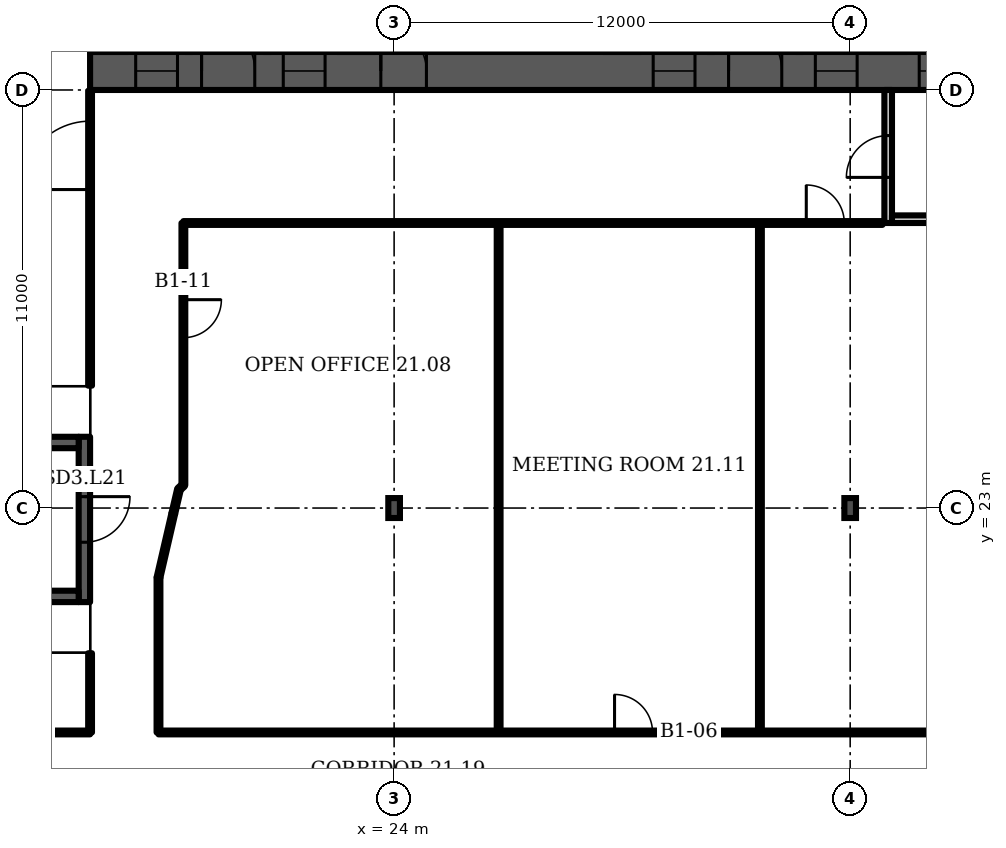
"""IFC4 building model, lengths in metres.
Left out: names, types, materials, properties, quantities, classifications, styles, units other than length and angle.
Written with IfcOpenShell. Run it as: python <this file> out.ifc"""

import sys

from ifc_helpers import new_model, si_unit, direction, frame, frame_2d, origin, origin_2d, place, context, subcontext, project, spatial, rectangle, i_section, extrude, element, fill, save


model = new_model("IFC4")
c1 = context("Model", 3, precision=1e-05, world=origin(), true_north=direction((0.0, 1.0)))
c2 = subcontext(c1, "Body", "Model", "MODEL_VIEW")
j1 = project(units=[si_unit("LENGTHUNIT", "METRE"), si_unit("PLANEANGLEUNIT", "RADIAN")], contexts=[c1])
p1 = place(None, origin())
s1 = spatial("IfcSite", under=j1, at=p1, CompositionType="ELEMENT")
p2 = place(p1, origin())
s2 = spatial("IfcBuilding", under=s1, at=p2, CompositionType="ELEMENT")
p3 = place(p2, frame((0.0, 0.0, 96.7)))
s3 = spatial("IfcBuildingStorey", under=s2, at=p3, CompositionType="ELEMENT", Elevation=96.7)
p4 = place(p3, frame((16.0, 34.5, 0.0), z_axis=(0.0, 0.0, 1.0), x_axis=(1.0, 0.0, 0.0)))
e1 = element("IfcWall", 1, at=p4, inside=s3, PredefinedType="SHEAR", context=c2, shape_type="SweptSolid", body=[
    extrude(rectangle(XDim=49.0, YDim=1.0, at=frame_2d((24.5, 0.0))), origin(), (0.0, 0.0, 1.0), 3.6),
])
p5 = place(p4, frame((1.2, 0.0, 0.0)))
e2 = element("IfcOpeningElement", 2, at=p5, cuts=e1, PredefinedType="OPENING", context=c2, shape_type="SweptSolid", body=[
    extrude(rectangle(XDim=1.1, YDim=2.1, at=frame_2d((0.55, 1.05))), frame((0.0, 0.51, 0.0), z_axis=(0.0, -1.0, 0.0), x_axis=(1.0, 0.0, 0.0)), (0.0, 0.0, 1.0), 1.02),
])
p6 = place(p4, frame((5.083, 0.0, 0.0)))
e3 = element("IfcOpeningElement", 3, at=p6, cuts=e1, PredefinedType="OPENING", context=c2, shape_type="SweptSolid", body=[
    extrude(rectangle(XDim=1.1, YDim=2.1, at=frame_2d((0.55, 1.05))), frame((0.0, 0.51, 0.0), z_axis=(0.0, -1.0, 0.0), x_axis=(1.0, 0.0, 0.0)), (0.0, 0.0, 1.0), 1.02),
])
p7 = place(p4, frame((2.933, 0.0, 0.0)))
e4 = element("IfcOpeningElement", 4, at=p7, cuts=e1, PredefinedType="OPENING", context=c2, shape_type="SweptSolid", body=[
    extrude(rectangle(XDim=1.4, YDim=2.1, at=frame_2d((0.7, 1.05))), frame((0.0, 0.51, 0.0), z_axis=(0.0, -1.0, 0.0), x_axis=(1.0, 0.0, 0.0)), (0.0, 0.0, 1.0), 1.02),
])
p8 = place(p4, frame((7.65, 0.0, 0.0)))
e5 = element("IfcOpeningElement", 5, at=p8, cuts=e1, PredefinedType="OPENING", context=c2, shape_type="SweptSolid", body=[
    extrude(rectangle(XDim=1.2, YDim=2.1, at=frame_2d((0.6, 1.05))), frame((0.0, 0.51, 0.0), z_axis=(0.0, -1.0, 0.0), x_axis=(1.0, 0.0, 0.0)), (0.0, 0.0, 1.0), 1.02),
])
p9 = place(p4, frame((14.817, 0.0, 0.0)))
e6 = element("IfcOpeningElement", 6, at=p9, cuts=e1, PredefinedType="OPENING", context=c2, shape_type="SweptSolid", body=[
    extrude(rectangle(XDim=1.1, YDim=2.1, at=frame_2d((0.55, 1.05))), frame((0.0, 0.51, 0.0), z_axis=(0.0, -1.0, 0.0), x_axis=(1.0, 0.0, 0.0)), (0.0, 0.0, 1.0), 1.02),
])
p10 = place(p4, frame((19.083, 0.0, 0.0)))
e7 = element("IfcOpeningElement", 7, at=p10, cuts=e1, PredefinedType="OPENING", context=c2, shape_type="SweptSolid", body=[
    extrude(rectangle(XDim=1.1, YDim=2.1, at=frame_2d((0.55, 1.05))), frame((0.0, 0.51, 0.0), z_axis=(0.0, -1.0, 0.0), x_axis=(1.0, 0.0, 0.0)), (0.0, 0.0, 1.0), 1.02),
])
p11 = place(p4, frame((16.8, 0.0, 0.0)))
e8 = element("IfcOpeningElement", 8, at=p11, cuts=e1, PredefinedType="OPENING", context=c2, shape_type="SweptSolid", body=[
    extrude(rectangle(XDim=1.4, YDim=2.1, at=frame_2d((0.7, 1.05))), frame((0.0, 0.51, 0.0), z_axis=(0.0, -1.0, 0.0), x_axis=(1.0, 0.0, 0.0)), (0.0, 0.0, 1.0), 1.02),
])
p12 = place(p4, frame((21.817, 0.0, 0.0)))
e9 = element("IfcOpeningElement", 9, at=p12, cuts=e1, PredefinedType="OPENING", context=c2, shape_type="SweptSolid", body=[
    extrude(rectangle(XDim=1.1, YDim=2.1, at=frame_2d((0.55, 1.05))), frame((0.0, 0.51, 0.0), z_axis=(0.0, -1.0, 0.0), x_axis=(1.0, 0.0, 0.0)), (0.0, 0.0, 1.0), 1.02),
])
p13 = place(p4, frame((26.083, 0.0, 0.0)))
e10 = element("IfcOpeningElement", 10, at=p13, cuts=e1, PredefinedType="OPENING", context=c2, shape_type="SweptSolid", body=[
    extrude(rectangle(XDim=1.1, YDim=2.1, at=frame_2d((0.55, 1.05))), frame((0.0, 0.51, 0.0), z_axis=(0.0, -1.0, 0.0), x_axis=(1.0, 0.0, 0.0)), (0.0, 0.0, 1.0), 1.02),
])
p14 = place(p4, frame((33.15, 0.0, 0.0)))
e11 = element("IfcOpeningElement", 11, at=p14, cuts=e1, PredefinedType="OPENING", context=c2, shape_type="SweptSolid", body=[
    extrude(rectangle(XDim=1.2, YDim=2.1, at=frame_2d((0.6, 1.05))), frame((0.0, 0.51, 0.0), z_axis=(0.0, -1.0, 0.0), x_axis=(1.0, 0.0, 0.0)), (0.0, 0.0, 1.0), 1.02),
])
p15 = place(p4, frame((37.8, 0.0, 0.0)))
e12 = element("IfcOpeningElement", 12, at=p15, cuts=e1, PredefinedType="OPENING", context=c2, shape_type="SweptSolid", body=[
    extrude(rectangle(XDim=1.4, YDim=2.1, at=frame_2d((0.7, 1.05))), frame((0.0, 0.51, 0.0), z_axis=(0.0, -1.0, 0.0), x_axis=(1.0, 0.0, 0.0)), (0.0, 0.0, 1.0), 1.02),
])
p16 = place(p4, frame((42.817, 0.0, 0.0)))
e13 = element("IfcOpeningElement", 13, at=p16, cuts=e1, PredefinedType="OPENING", context=c2, shape_type="SweptSolid", body=[
    extrude(rectangle(XDim=1.1, YDim=2.1, at=frame_2d((0.55, 1.05))), frame((0.0, 0.51, 0.0), z_axis=(0.0, -1.0, 0.0), x_axis=(1.0, 0.0, 0.0)), (0.0, 0.0, 1.0), 1.02),
])
p17 = place(p4, frame((46.7, 0.0, 0.0)))
e14 = element("IfcOpeningElement", 14, at=p17, cuts=e1, PredefinedType="OPENING", context=c2, shape_type="SweptSolid", body=[
    extrude(rectangle(XDim=1.1, YDim=2.1, at=frame_2d((0.55, 1.05))), frame((0.0, 0.51, 0.0), z_axis=(0.0, -1.0, 0.0), x_axis=(1.0, 0.0, 0.0)), (0.0, 0.0, 1.0), 1.02),
])
p18 = place(p4, frame((44.667, 0.0, 0.0)))
e15 = element("IfcOpeningElement", 15, at=p18, cuts=e1, PredefinedType="OPENING", context=c2, shape_type="SweptSolid", body=[
    extrude(rectangle(XDim=1.4, YDim=2.1, at=frame_2d((0.7, 1.05))), frame((0.0, 0.51, 0.0), z_axis=(0.0, -1.0, 0.0), x_axis=(1.0, 0.0, 0.0)), (0.0, 0.0, 1.0), 1.02),
])
for number, where, z_axis, x_axis in (
    (16, (24.0, 23.0, 0.0), (0.0, 0.0, 1.0), (1.0, 0.0, 0.0)),
    (17, (36.0, 23.0, 0.0), (0.0, 0.0, 1.0), (1.0, 0.0, 0.0)),
):
    element("IfcColumn", number, at=place(p3, frame(where, z_axis=z_axis, x_axis=x_axis)), inside=s3, PredefinedType="COLUMN", context=c2, shape_type="SweptSolid", body=[
        extrude(i_section(OverallWidth=0.306, OverallDepth=0.524, WebThickness=0.021, FlangeThickness=0.04, FilletRadius=0.027, at=origin_2d()), origin(), (0.0, 0.0, 1.0), 3.6),
    ])
p19 = place(p3, frame((37.0, 30.5, 0.0), z_axis=(0.0, 0.0, 1.0), x_axis=(0.0, 1.0, 0.0)))
e18 = element("IfcWall", 18, at=p19, inside=s3, PredefinedType="PARTITIONING", context=c2, shape_type="SweptSolid", body=[
    extrude(rectangle(XDim=3.5, YDim=0.2, at=frame_2d((1.75, 0.0))), origin(), (0.0, 0.0, 1.0), 3.2),
])
p20 = place(p19, frame((1.2, 0.0, 0.0)))
e19 = element("IfcOpeningElement", 19, at=p20, cuts=e18, PredefinedType="OPENING", context=c2, shape_type="SweptSolid", body=[
    extrude(rectangle(XDim=1.1, YDim=2.1, at=frame_2d((0.55, 1.05))), frame((0.0, 0.11, 0.0), z_axis=(0.0, -1.0, 0.0), x_axis=(1.0, 0.0, 0.0)), (0.0, 0.0, 1.0), 0.22),
])
p21 = place(p3, frame((37.1, 30.6, 0.0), z_axis=(0.0, 0.0, 1.0), x_axis=(1.0, 0.0, 0.0)))
e20 = element("IfcWall", 20, at=p21, inside=s3, PredefinedType="PARTITIONING", context=c2, shape_type="SweptSolid", body=[
    extrude(rectangle(XDim=2.8, YDim=0.2, at=frame_2d((1.4, 0.0))), origin(), (0.0, 0.0, 1.0), 3.2),
])
p22 = place(p3, frame((15.85, 20.525, 0.0), z_axis=(0.0, 0.0, 1.0), x_axis=(0.0, 1.0, 0.0)))
e21 = element("IfcWall", 21, at=p22, inside=s3, PredefinedType="SHEAR", context=c2, shape_type="SweptSolid", body=[
    extrude(rectangle(XDim=4.35, YDim=0.3, at=frame_2d((2.175, 0.0))), origin(), (0.0, 0.0, 1.0), 3.2),
])
p23 = place(p22, frame((1.575, 0.0, 0.0)))
e22 = element("IfcOpeningElement", 22, at=p23, cuts=e21, PredefinedType="OPENING", context=c2, shape_type="SweptSolid", body=[
    extrude(rectangle(XDim=1.2, YDim=2.1, at=frame_2d((0.6, 1.05))), frame((0.0, 0.16, 0.0), z_axis=(0.0, -1.0, 0.0), x_axis=(1.0, 0.0, 0.0)), (0.0, 0.0, 1.0), 0.32),
])
p24 = place(p3, frame((7.51, 17.095, 0.0), z_axis=(0.0, 0.0, 1.0), x_axis=(1.0, 0.0, 0.0)))
e23 = element("IfcWall", 23, at=p24, inside=s3, PredefinedType="PARTITIONING", context=c2, shape_type="SweptSolid", body=[
    extrude(rectangle(XDim=8.49, YDim=0.1, at=frame_2d((4.245, 0.0))), origin(), (0.0, 0.0, 1.0), 3.2),
])
p25 = place(p24, frame((4.775, 0.0, 0.0)))
e24 = element("IfcOpeningElement", 24, at=p25, cuts=e23, PredefinedType="OPENING", context=c2, shape_type="SweptSolid", body=[
    extrude(rectangle(XDim=1.0, YDim=2.1, at=frame_2d((0.5, 1.05))), frame((0.0, 0.06, 0.0), z_axis=(0.0, -1.0, 0.0), x_axis=(1.0, 0.0, 0.0)), (0.0, 0.0, 1.0), 0.12),
])
p26 = place(p3, frame((16.0, 17.095, 0.0), z_axis=(0.0, 0.0, 1.0), x_axis=(0.0, 1.0, 0.0)))
e25 = element("IfcWall", 25, at=p26, inside=s3, PredefinedType="PARTITIONING", context=c2, shape_type="SweptSolid", body=[
    extrude(rectangle(XDim=2.085, YDim=0.1, at=frame_2d((1.042, 0.0))), origin(), (0.0, 0.0, 1.0), 3.2),
])
p27 = place(p3, frame((16.0, 26.22, 0.0), z_axis=(0.0, 0.0, 1.0), x_axis=(0.0, 1.0, 0.0)))
e26 = element("IfcWall", 26, at=p27, inside=s3, PredefinedType="PARTITIONING", context=c2, shape_type="SweptSolid", body=[
    extrude(rectangle(XDim=7.76, YDim=0.1, at=frame_2d((3.88, 0.0))), origin(), (0.0, 0.0, 1.0), 3.2),
])
p28 = place(p27, frame((5.16, 0.0, 0.0)))
e27 = element("IfcOpeningElement", 27, at=p28, cuts=e26, PredefinedType="OPENING", context=c2, shape_type="SweptSolid", body=[
    extrude(rectangle(XDim=1.8, YDim=2.1, at=frame_2d((0.9, 1.05))), frame((0.0, 0.06, 0.0), z_axis=(0.0, -1.0, 0.0), x_axis=(1.0, 0.0, 0.0)), (0.0, 0.0, 1.0), 0.12),
])
p29 = place(p3, frame((17.8, 17.095, 0.0), z_axis=(0.0, 0.0, 1.0), x_axis=(0.0, 1.0, 0.0)))
e28 = element("IfcWall", 28, at=p29, inside=s3, PredefinedType="PARTITIONING", context=c2, shape_type="SweptSolid", body=[
    extrude(rectangle(XDim=4.075, YDim=0.1, at=frame_2d((2.038, 0.0))), origin(), (0.0, 0.0, 1.0), 3.2),
])
p30 = place(p3, frame((17.8, 17.095, 0.0), z_axis=(0.0, 0.0, 1.0), x_axis=(1.0, 0.0, 0.0)))
e29 = element("IfcWall", 29, at=p30, inside=s3, PredefinedType="PARTITIONING", context=c2, shape_type="SweptSolid", body=[
    extrude(rectangle(XDim=67.8, YDim=0.1, at=frame_2d((33.9, 0.0))), origin(), (0.0, 0.0, 1.0), 3.2),
])
p31 = place(p30, frame((12.0, 0.0, 0.0)))
e30 = element("IfcOpeningElement", 30, at=p31, cuts=e29, PredefinedType="OPENING", context=c2, shape_type="SweptSolid", body=[
    extrude(rectangle(XDim=1.0, YDim=2.1, at=frame_2d((0.5, 1.05))), frame((0.0, 0.06, 0.0), z_axis=(0.0, -1.0, 0.0), x_axis=(1.0, 0.0, 0.0)), (0.0, 0.0, 1.0), 0.12),
])
p32 = place(p30, frame((48.5, 0.0, 0.0)))
e31 = element("IfcOpeningElement", 31, at=p32, cuts=e29, PredefinedType="OPENING", context=c2, shape_type="SweptSolid", body=[
    extrude(rectangle(XDim=1.8, YDim=2.1, at=frame_2d((0.9, 1.05))), frame((0.0, 0.06, 0.0), z_axis=(0.0, -1.0, 0.0), x_axis=(1.0, 0.0, 0.0)), (0.0, 0.0, 1.0), 0.12),
])
p33 = place(p30, frame((56.825, 0.0, 0.0)))
e32 = element("IfcOpeningElement", 32, at=p33, cuts=e29, PredefinedType="OPENING", context=c2, shape_type="SweptSolid", body=[
    extrude(rectangle(XDim=1.0, YDim=2.1, at=frame_2d((0.5, 1.05))), frame((0.0, 0.06, 0.0), z_axis=(0.0, -1.0, 0.0), x_axis=(1.0, 0.0, 0.0)), (0.0, 0.0, 1.0), 0.12),
])
p34 = place(p30, frame((60.825, 0.0, 0.0)))
e33 = element("IfcOpeningElement", 33, at=p34, cuts=e29, PredefinedType="OPENING", context=c2, shape_type="SweptSolid", body=[
    extrude(rectangle(XDim=1.0, YDim=2.1, at=frame_2d((0.5, 1.05))), frame((0.0, 0.06, 0.0), z_axis=(0.0, -1.0, 0.0), x_axis=(1.0, 0.0, 0.0)), (0.0, 0.0, 1.0), 0.12),
])
p35 = place(p30, frame((64.981, 0.0, 0.0)))
e34 = element("IfcOpeningElement", 34, at=p35, cuts=e29, PredefinedType="OPENING", context=c2, shape_type="SweptSolid", body=[
    extrude(rectangle(XDim=1.0, YDim=2.1, at=frame_2d((0.5, 1.05))), frame((0.0, 0.06, 0.0), z_axis=(0.0, -1.0, 0.0), x_axis=(1.0, 0.0, 0.0)), (0.0, 0.0, 1.0), 0.12),
])
p36 = place(p3, frame((17.8, 21.17, 0.0), z_axis=(0.0, 0.0, 1.0), x_axis=(0.225426, 0.974258, 0.0)))
e35 = element("IfcWall", 35, at=p36, inside=s3, PredefinedType="PARTITIONING", context=c2, shape_type="SweptSolid", body=[
    extrude(rectangle(XDim=1.729, YDim=0.1, at=frame_2d((0.865, 0.0))), origin(), (0.0, 0.0, 1.0), 3.2),
])
p37 = place(p3, frame((18.19, 22.855, 0.0), z_axis=(0.0, 0.0, 1.0), x_axis=(0.228356, 0.973576, 0.0)))
e36 = element("IfcWall", 36, at=p37, inside=s3, PredefinedType="PARTITIONING", context=c2, shape_type="SweptSolid", body=[
    extrude(rectangle(XDim=0.657, YDim=0.1, at=frame_2d((0.329, 0.0))), origin(), (0.0, 0.0, 1.0), 3.2),
])
p38 = place(p3, frame((18.34, 23.495, 0.0), z_axis=(0.0, 0.0, 1.0), x_axis=(0.738517, 0.67423, 0.0)))
e37 = element("IfcWall", 37, at=p38, inside=s3, PredefinedType="PARTITIONING", context=c2, shape_type="SweptSolid", body=[
    extrude(rectangle(XDim=0.156, YDim=0.1, at=frame_2d((0.078, 0.0))), origin(), (0.0, 0.0, 1.0), 3.2),
])
p39 = place(p3, frame((18.455, 23.6, 0.0), z_axis=(0.0, 0.0, 1.0), x_axis=(0.0, 1.0, 0.0)))
e38 = element("IfcWall", 38, at=p39, inside=s3, PredefinedType="PARTITIONING", context=c2, shape_type="SweptSolid", body=[
    extrude(rectangle(XDim=6.9, YDim=0.1, at=frame_2d((3.45, 0.0))), origin(), (0.0, 0.0, 1.0), 3.2),
])
p40 = place(p39, frame((3.882, 0.0, 0.0)))
e39 = element("IfcOpeningElement", 39, at=p40, cuts=e38, PredefinedType="OPENING", context=c2, shape_type="SweptSolid", body=[
    extrude(rectangle(XDim=1.0, YDim=2.1, at=frame_2d((0.5, 1.05))), frame((0.0, 0.06, 0.0), z_axis=(0.0, -1.0, 0.0), x_axis=(1.0, 0.0, 0.0)), (0.0, 0.0, 1.0), 0.12),
])
p41 = place(p3, frame((18.455, 30.5, 0.0), z_axis=(0.0, 0.0, 1.0), x_axis=(1.0, 0.0, 0.0)))
e40 = element("IfcWall", 40, at=p41, inside=s3, PredefinedType="PARTITIONING", context=c2, shape_type="SweptSolid", body=[
    extrude(rectangle(XDim=18.395, YDim=0.1, at=frame_2d((9.198, 0.0))), origin(), (0.0, 0.0, 1.0), 3.2),
])
p42 = place(p41, frame((16.39, 0.0, 0.0)))
e41 = element("IfcOpeningElement", 41, at=p42, cuts=e40, PredefinedType="OPENING", context=c2, shape_type="SweptSolid", body=[
    extrude(rectangle(XDim=1.0, YDim=2.1, at=frame_2d((0.5, 1.05))), frame((0.0, 0.06, 0.0), z_axis=(0.0, -1.0, 0.0), x_axis=(1.0, 0.0, 0.0)), (0.0, 0.0, 1.0), 0.12),
])
for number, where, z_axis, x_axis in (
    (42, (26.75, 17.095, 0.0), (0.0, 0.0, 1.0), (0.0, 1.0, 0.0)),
    (43, (33.625, 17.095, 0.0), (0.0, 0.0, 1.0), (0.0, 1.0, 0.0)),
):
    element("IfcWall", number, at=place(p3, frame(where, z_axis=z_axis, x_axis=x_axis)), inside=s3, PredefinedType="PARTITIONING", context=c2, shape_type="SweptSolid", body=[
        extrude(rectangle(XDim=13.405, YDim=0.1, at=frame_2d((6.703, 0.0))), origin(), (0.0, 0.0, 1.0), 3.2),
    ])
for number, where, z_axis, x_axis in (
    (44, (8.2, 20.675, 0.0), (0.0, 0.0, 1.0), (1.0, 0.0, 0.0)),
    (45, (8.2, 24.725, 0.0), (0.0, 0.0, 1.0), (1.0, 0.0, 0.0)),
):
    element("IfcWall", number, at=place(p3, frame(where, z_axis=z_axis, x_axis=x_axis)), inside=s3, PredefinedType="SHEAR", context=c2, shape_type="SweptSolid", body=[
        extrude(rectangle(XDim=7.5, YDim=0.3, at=frame_2d((3.75, 0.0))), origin(), (0.0, 0.0, 1.0), 3.2),
    ])
p43 = place(p5, origin())
e46 = element("IfcDoor", 46, at=p43, inside=s3, OperationType="DOUBLE_DOOR_SLIDING", PredefinedType="DOOR", context=c2, shape_type="SweptSolid", body=[
    extrude(rectangle(XDim=1.1, YDim=2.1, at=frame_2d((0.55, 1.05))), frame((0.0, 0.025, 0.0), z_axis=(0.0, -1.0, 0.0), x_axis=(1.0, 0.0, 0.0)), (0.0, 0.0, 1.0), 0.05),
])
fill(e2, e46)
p44 = place(p6, origin())
e47 = element("IfcDoor", 47, at=p44, inside=s3, OperationType="DOUBLE_DOOR_SLIDING", PredefinedType="DOOR", context=c2, shape_type="SweptSolid", body=[
    extrude(rectangle(XDim=1.1, YDim=2.1, at=frame_2d((0.55, 1.05))), frame((0.0, 0.025, 0.0), z_axis=(0.0, -1.0, 0.0), x_axis=(1.0, 0.0, 0.0)), (0.0, 0.0, 1.0), 0.05),
])
fill(e3, e47)
p45 = place(p7, origin())
e48 = element("IfcDoor", 48, at=p45, inside=s3, OperationType="DOUBLE_DOOR_SINGLE_SWING", PredefinedType="DOOR", context=c2, shape_type="SweptSolid", body=[
    extrude(rectangle(XDim=1.4, YDim=2.1, at=frame_2d((0.7, 1.05))), frame((0.0, 0.025, 0.0), z_axis=(0.0, -1.0, 0.0), x_axis=(1.0, 0.0, 0.0)), (0.0, 0.0, 1.0), 0.05),
])
fill(e4, e48)
p46 = place(p8, origin())
e49 = element("IfcDoor", 49, at=p46, inside=s3, OperationType="SINGLE_SWING_LEFT", PredefinedType="DOOR", context=c2, shape_type="SweptSolid", body=[
    extrude(rectangle(XDim=1.2, YDim=2.1, at=frame_2d((0.6, 1.05))), frame((0.0, 0.025, 0.0), z_axis=(0.0, -1.0, 0.0), x_axis=(1.0, 0.0, 0.0)), (0.0, 0.0, 1.0), 0.05),
])
fill(e5, e49)
p47 = place(p9, origin())
e50 = element("IfcDoor", 50, at=p47, inside=s3, OperationType="DOUBLE_DOOR_SLIDING", PredefinedType="DOOR", context=c2, shape_type="SweptSolid", body=[
    extrude(rectangle(XDim=1.1, YDim=2.1, at=frame_2d((0.55, 1.05))), frame((0.0, 0.025, 0.0), z_axis=(0.0, -1.0, 0.0), x_axis=(1.0, 0.0, 0.0)), (0.0, 0.0, 1.0), 0.05),
])
fill(e6, e50)
p48 = place(p10, origin())
e51 = element("IfcDoor", 51, at=p48, inside=s3, OperationType="DOUBLE_DOOR_SLIDING", PredefinedType="DOOR", context=c2, shape_type="SweptSolid", body=[
    extrude(rectangle(XDim=1.1, YDim=2.1, at=frame_2d((0.55, 1.05))), frame((0.0, 0.025, 0.0), z_axis=(0.0, -1.0, 0.0), x_axis=(1.0, 0.0, 0.0)), (0.0, 0.0, 1.0), 0.05),
])
fill(e7, e51)
p49 = place(p11, origin())
e52 = element("IfcDoor", 52, at=p49, inside=s3, OperationType="DOUBLE_DOOR_SINGLE_SWING", PredefinedType="DOOR", context=c2, shape_type="SweptSolid", body=[
    extrude(rectangle(XDim=1.4, YDim=2.1, at=frame_2d((0.7, 1.05))), frame((0.0, 0.025, 0.0), z_axis=(0.0, -1.0, 0.0), x_axis=(1.0, 0.0, 0.0)), (0.0, 0.0, 1.0), 0.05),
])
fill(e8, e52)
p50 = place(p12, origin())
e53 = element("IfcDoor", 53, at=p50, inside=s3, OperationType="DOUBLE_DOOR_SLIDING", PredefinedType="DOOR", context=c2, shape_type="SweptSolid", body=[
    extrude(rectangle(XDim=1.1, YDim=2.1, at=frame_2d((0.55, 1.05))), frame((0.0, 0.025, 0.0), z_axis=(0.0, -1.0, 0.0), x_axis=(1.0, 0.0, 0.0)), (0.0, 0.0, 1.0), 0.05),
])
fill(e9, e53)
p51 = place(p20, origin())
e54 = element("IfcDoor", 54, at=p51, inside=s3, OperationType="SINGLE_SWING_LEFT", PredefinedType="DOOR", context=c2, shape_type="SweptSolid", body=[
    extrude(rectangle(XDim=1.1, YDim=2.1, at=frame_2d((0.55, 1.05))), frame((0.0, 0.025, 0.0), z_axis=(0.0, -1.0, 0.0), x_axis=(1.0, 0.0, 0.0)), (0.0, 0.0, 1.0), 0.05),
])
fill(e19, e54)
p52 = place(p23, origin())
e55 = element("IfcDoor", 55, at=p52, inside=s3, OperationType="SINGLE_SWING_RIGHT", PredefinedType="DOOR", context=c2, shape_type="SweptSolid", body=[
    extrude(rectangle(XDim=1.2, YDim=2.1, at=frame_2d((0.6, 1.05))), frame((0.0, 0.025, 0.0), z_axis=(0.0, -1.0, 0.0), x_axis=(1.0, 0.0, 0.0)), (0.0, 0.0, 1.0), 0.05),
])
fill(e22, e55)
p53 = place(p31, origin())
e56 = element("IfcDoor", 56, at=p53, inside=s3, OperationType="SINGLE_SWING_LEFT", PredefinedType="DOOR", context=c2, shape_type="SweptSolid", body=[
    extrude(rectangle(XDim=1.0, YDim=2.1, at=frame_2d((0.5, 1.05))), frame((0.0, 0.025, 0.0), z_axis=(0.0, -1.0, 0.0), x_axis=(1.0, 0.0, 0.0)), (0.0, 0.0, 1.0), 0.05),
])
fill(e30, e56)
p54 = place(p40, origin())
e57 = element("IfcDoor", 57, at=p54, inside=s3, OperationType="SINGLE_SWING_RIGHT", PredefinedType="DOOR", context=c2, shape_type="SweptSolid", body=[
    extrude(rectangle(XDim=1.0, YDim=2.1, at=frame_2d((0.5, 1.05))), frame((0.0, 0.025, 0.0), z_axis=(0.0, -1.0, 0.0), x_axis=(1.0, 0.0, 0.0)), (0.0, 0.0, 1.0), 0.05),
])
fill(e39, e57)
p55 = place(p42, origin())
e58 = element("IfcDoor", 58, at=p55, inside=s3, OperationType="SINGLE_SWING_LEFT", PredefinedType="DOOR", context=c2, shape_type="SweptSolid", body=[
    extrude(rectangle(XDim=1.0, YDim=2.1, at=frame_2d((0.5, 1.05))), frame((0.0, 0.025, 0.0), z_axis=(0.0, -1.0, 0.0), x_axis=(1.0, 0.0, 0.0)), (0.0, 0.0, 1.0), 0.05),
])
fill(e41, e58)
p56 = place(p28, origin())
e59 = element("IfcDoor", 59, at=p56, inside=s3, OperationType="DOUBLE_DOOR_SINGLE_SWING", PredefinedType="DOOR", context=c2, shape_type="SweptSolid", body=[
    extrude(rectangle(XDim=1.8, YDim=2.1, at=frame_2d((0.9, 1.05))), frame((0.0, 0.025, 0.0), z_axis=(0.0, -1.0, 0.0), x_axis=(1.0, 0.0, 0.0)), (0.0, 0.0, 1.0), 0.05),
])
fill(e27, e59)
save(model, sys.argv[1])
